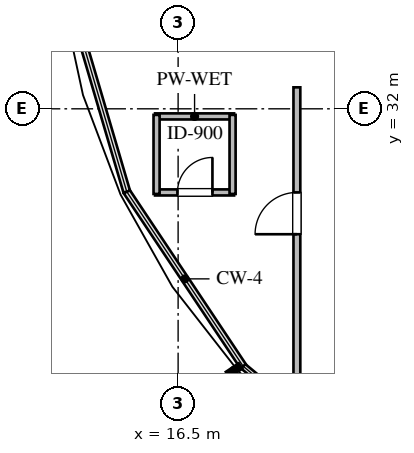
"""IFC4 building model, lengths in metres.
Left out: names, types, materials, properties, quantities, classifications, styles, units other than length and angle.
Written with IfcOpenShell. Run it as: python <this file> out.ifc"""

import sys

from ifc_helpers import new_model, si_unit, direction, frame, frame_2d, origin, place, context, subcontext, project, spatial, rectangle, extrude, element, fill, save


model = new_model("IFC4")
c1 = context("Model", 3, precision=1e-05, world=origin(), true_north=direction((0.0, 1.0)))
c2 = subcontext(c1, "Body", "Model", "MODEL_VIEW")
j1 = project(units=[si_unit("LENGTHUNIT", "METRE"), si_unit("PLANEANGLEUNIT", "RADIAN")], contexts=[c1])
p1 = place(None, origin())
s1 = spatial("IfcSite", under=j1, at=p1, CompositionType="ELEMENT")
p2 = place(p1, origin())
s2 = spatial("IfcBuilding", under=s1, at=p2, CompositionType="ELEMENT")
p3 = place(p2, frame((0.0, 0.0, 231.6)))
s3 = spatial("IfcBuildingStorey", under=s2, at=p3, CompositionType="ELEMENT", Elevation=231.6)
p4 = place(p3, frame((15.893, 29.8, 0.0), z_axis=(0.0, 0.0, 1.0), x_axis=(1.0, 0.0, 0.0)))
e1 = element("IfcWall", 1, at=p4, inside=s3, PredefinedType="PLUMBINGWALL", context=c2, shape_type="SweptSolid", body=[
    extrude(rectangle(XDim=2.08, YDim=0.16, at=frame_2d((1.04, 0.0))), origin(), (0.0, 0.0, 1.0), 3.36),
])
p5 = place(p4, frame((0.59, 0.0, 0.0)))
e2 = element("IfcOpeningElement", 2, at=p5, cuts=e1, PredefinedType="OPENING", context=c2, shape_type="SweptSolid", body=[
    extrude(rectangle(XDim=0.92, YDim=2.1, at=frame_2d((0.46, 1.05))), frame((0.0, 0.09, 0.0), z_axis=(0.0, -1.0, 0.0), x_axis=(1.0, 0.0, 0.0)), (0.0, 0.0, 1.0), 0.18),
])
p6 = place(p3, frame((15.893, 31.8, 0.0), z_axis=(0.0, 0.0, 1.0), x_axis=(1.0, 0.0, 0.0)))
e3 = element("IfcWall", 3, at=p6, inside=s3, PredefinedType="PLUMBINGWALL", context=c2, shape_type="SweptSolid", body=[
    extrude(rectangle(XDim=2.08, YDim=0.16, at=frame_2d((1.04, 0.0))), origin(), (0.0, 0.0, 1.0), 3.36),
])
p7 = place(p3, frame((15.933, 29.76, 0.0), z_axis=(0.0, 0.0, 1.0), x_axis=(0.0, 1.0, 0.0)))
e4 = element("IfcWall", 4, at=p7, inside=s3, PredefinedType="PLUMBINGWALL", context=c2, shape_type="SweptSolid", body=[
    extrude(rectangle(XDim=2.08, YDim=0.16, at=frame_2d((1.04, 0.0))), origin(), (0.0, 0.0, 1.0), 3.36),
])
p8 = place(p3, frame((17.933, 29.76, 0.0), z_axis=(0.0, 0.0, 1.0), x_axis=(0.0, 1.0, 0.0)))
e5 = element("IfcWall", 5, at=p8, inside=s3, PredefinedType="PLUMBINGWALL", context=c2, shape_type="SweptSolid", body=[
    extrude(rectangle(XDim=2.08, YDim=0.16, at=frame_2d((1.04, 0.0))), origin(), (0.0, 0.0, 1.0), 2.817),
])
p9 = place(p3, frame((19.625, 24.06, 0.0), z_axis=(0.0, 0.0, 1.0), x_axis=(0.0, 1.0, 0.0)))
e6 = element("IfcWall", 6, at=p9, inside=s3, PredefinedType="PARTITIONING", context=c2, shape_type="SweptSolid", body=[
    extrude(rectangle(XDim=8.505, YDim=0.18, at=frame_2d((4.252, 0.0))), origin(), (0.0, 0.0, 1.0), 2.817),
])
p10 = place(p9, frame((4.64, 0.0, 0.0)))
e7 = element("IfcOpeningElement", 7, at=p10, cuts=e6, PredefinedType="OPENING", context=c2, shape_type="SweptSolid", body=[
    extrude(rectangle(XDim=1.1, YDim=2.1, at=frame_2d((0.55, 1.05))), frame((0.0, 0.1, 0.0), z_axis=(0.0, -1.0, 0.0), x_axis=(1.0, 0.0, 0.0)), (0.0, 0.0, 1.0), 0.2),
])
p11 = place(p5, origin())
e8 = element("IfcDoor", 8, at=p11, inside=s3, OperationType="SINGLE_SWING_RIGHT", PredefinedType="DOOR", context=c2, shape_type="SweptSolid", body=[
    extrude(rectangle(XDim=0.92, YDim=2.1, at=frame_2d((0.46, 1.05))), frame((0.0, 0.025, 0.0), z_axis=(0.0, -1.0, 0.0), x_axis=(1.0, 0.0, 0.0)), (0.0, 0.0, 1.0), 0.05),
])
fill(e2, e8)
p12 = place(p10, origin())
e9 = element("IfcDoor", 9, at=p12, inside=s3, OperationType="SINGLE_SWING_LEFT", PredefinedType="DOOR", context=c2, shape_type="SweptSolid", body=[
    extrude(rectangle(XDim=1.1, YDim=2.1, at=frame_2d((0.55, 1.05))), frame((0.0, 0.025, 0.0), z_axis=(0.0, -1.0, 0.0), x_axis=(1.0, 0.0, 0.0)), (0.0, 0.0, 1.0), 0.05),
])
fill(e7, e9)
save(model, sys.argv[1])
